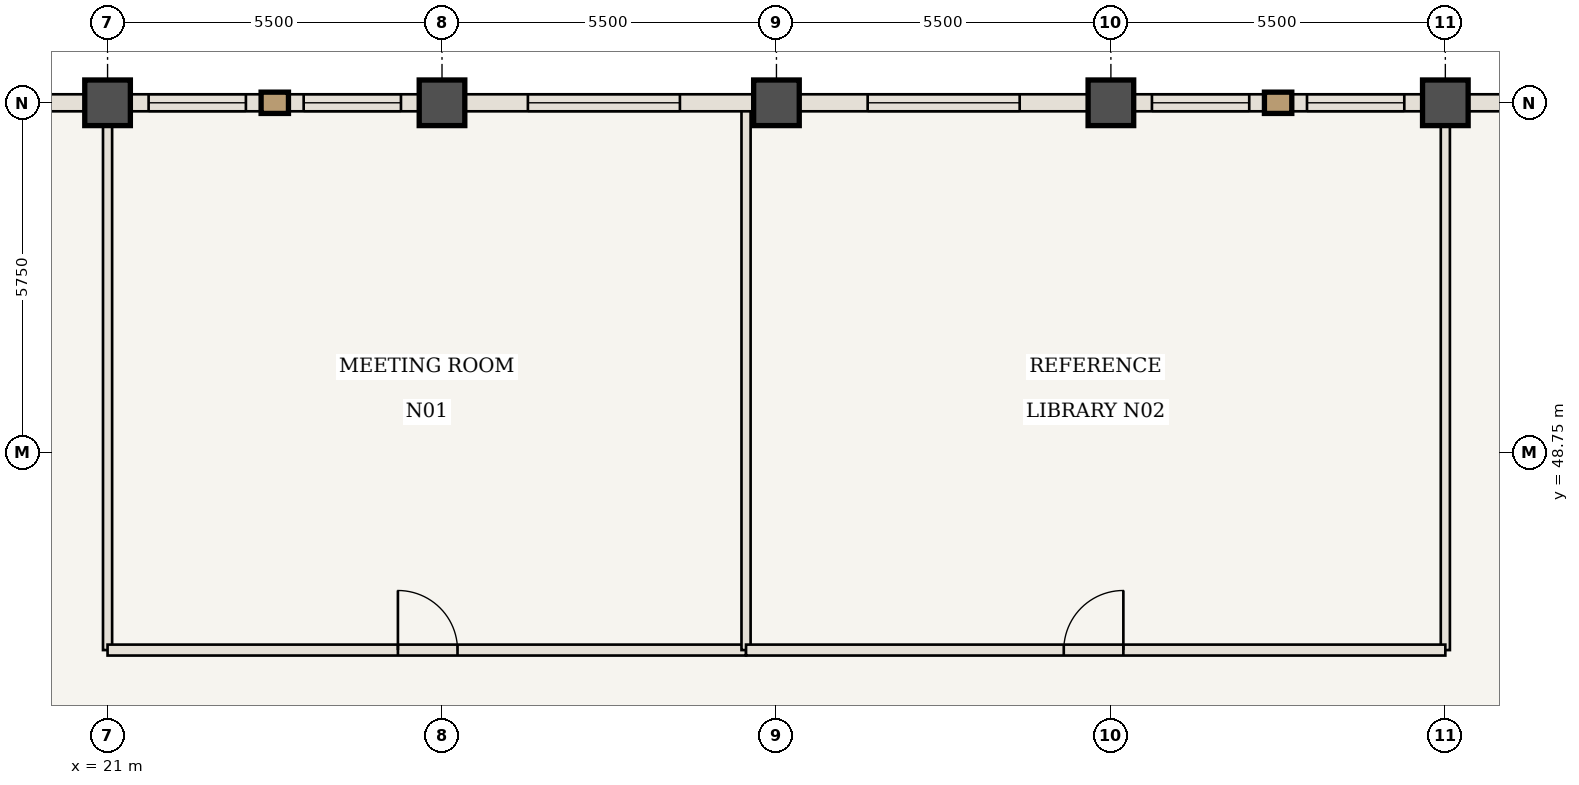
"""IFC4 building model, lengths in metres.
Left out: names, types, materials, properties, quantities, classifications, styles, units other than length and angle.
Written with IfcOpenShell. Run it as: python <this file> out.ifc"""

import sys

from ifc_helpers import new_model, si_unit, direction, frame, frame_2d, origin, origin_2d, place, context, subcontext, project, spatial, rectangle, extrude, element, fill, save


model = new_model("IFC4")
c1 = context("Model", 3, precision=1e-05, world=origin(), true_north=direction((0.0, 1.0)))
c2 = subcontext(c1, "Body", "Model", "MODEL_VIEW")
j1 = project(units=[si_unit("LENGTHUNIT", "METRE"), si_unit("PLANEANGLEUNIT", "RADIAN")], contexts=[c1])
p1 = place(None, origin())
s1 = spatial("IfcSite", under=j1, at=p1, CompositionType="ELEMENT")
p2 = place(p1, origin())
s2 = spatial("IfcBuilding", under=s1, at=p2, CompositionType="ELEMENT")
p3 = place(p2, frame((0.0, 0.0, 262.15)))
s3 = spatial("IfcBuildingStorey", under=s2, at=p3, CompositionType="ELEMENT", Elevation=262.15)
for number, where, z_axis, x_axis in (
    (1, (21.0, 54.5, 0.0), (0.0, 0.0, 1.0), (1.0, 0.0, 0.0)),
    (2, (26.5, 54.5, 0.0), (0.0, 0.0, 1.0), (1.0, 0.0, 0.0)),
    (3, (32.0, 54.5, 0.0), (0.0, 0.0, 1.0), (1.0, 0.0, 0.0)),
    (4, (37.5, 54.5, 0.0), (0.0, 0.0, 1.0), (1.0, 0.0, 0.0)),
    (5, (43.0, 54.5, 0.0), (0.0, 0.0, 1.0), (1.0, 0.0, 0.0)),
):
    element("IfcColumn", number, at=place(p3, frame(where, z_axis=z_axis, x_axis=x_axis)), inside=s3, PredefinedType="COLUMN", context=c2, shape_type="SweptSolid", body=[
        extrude(rectangle(XDim=0.75, YDim=0.75, at=origin_2d()), origin(), (0.0, 0.0, 1.0), 3.85),
    ])
for number, where, z_axis, x_axis in (
    (6, (21.0, 45.5, 0.0), (0.0, 0.0, 1.0), (0.0, 1.0, 0.0)),
    (7, (43.0, 45.5, 0.0), (0.0, 0.0, 1.0), (0.0, 1.0, 0.0)),
):
    element("IfcWall", number, at=place(p3, frame(where, z_axis=z_axis, x_axis=x_axis)), inside=s3, PredefinedType="STANDARD", context=c2, shape_type="SweptSolid", body=[
        extrude(rectangle(XDim=8.94, YDim=0.15, at=frame_2d((4.47, 0.0))), origin(), (0.0, 0.0, 1.0), 3.43),
    ])
p4 = place(p3, frame((21.0, 45.5, 0.0), z_axis=(0.0, 0.0, 1.0), x_axis=(1.0, 0.0, 0.0)))
e8 = element("IfcWall", 8, at=p4, inside=s3, PredefinedType="STANDARD", context=c2, shape_type="SweptSolid", body=[
    extrude(rectangle(XDim=10.5, YDim=0.18, at=frame_2d((5.25, 0.0))), origin(), (0.0, 0.0, 1.0), 3.43),
])
p5 = place(p4, frame((4.775, 0.0, 0.0)))
e9 = element("IfcOpeningElement", 9, at=p5, cuts=e8, PredefinedType="OPENING", context=c2, shape_type="SweptSolid", body=[
    extrude(rectangle(XDim=0.98, YDim=2.2, at=frame_2d((0.49, 1.1))), frame((0.0, 0.1, 0.0), z_axis=(0.0, -1.0, 0.0), x_axis=(1.0, 0.0, 0.0)), (0.0, 0.0, 1.0), 0.2),
])
p6 = place(p3, frame((31.5, 45.5, 0.0), z_axis=(0.0, 0.0, 1.0), x_axis=(0.0, 1.0, 0.0)))
e10 = element("IfcWall", 10, at=p6, inside=s3, PredefinedType="STANDARD", context=c2, shape_type="SweptSolid", body=[
    extrude(rectangle(XDim=8.94, YDim=0.15, at=frame_2d((4.47, 0.0))), origin(), (0.0, 0.0, 1.0), 3.43),
])
p7 = place(p3, frame((31.5, 45.5, 0.0), z_axis=(0.0, 0.0, 1.0), x_axis=(1.0, 0.0, 0.0)))
e11 = element("IfcWall", 11, at=p7, inside=s3, PredefinedType="STANDARD", context=c2, shape_type="SweptSolid", body=[
    extrude(rectangle(XDim=11.5, YDim=0.18, at=frame_2d((5.75, 0.0))), origin(), (0.0, 0.0, 1.0), 3.43),
])
p8 = place(p7, frame((5.225, 0.0, 0.0)))
e12 = element("IfcOpeningElement", 12, at=p8, cuts=e11, PredefinedType="OPENING", context=c2, shape_type="SweptSolid", body=[
    extrude(rectangle(XDim=0.98, YDim=2.2, at=frame_2d((0.49, 1.1))), frame((0.0, 0.1, 0.0), z_axis=(0.0, -1.0, 0.0), x_axis=(1.0, 0.0, 0.0)), (0.0, 0.0, 1.0), 0.2),
])
p9 = place(p3, frame((15.5, 54.5, 0.0), z_axis=(0.0, 0.0, 1.0), x_axis=(1.0, 0.0, 0.0)))
e13 = element("IfcWall", 13, at=p9, inside=s3, PredefinedType="USERDEFINED", context=c2, shape_type="SweptSolid", body=[
    extrude(rectangle(XDim=5.5, YDim=0.28, at=frame_2d((2.75, 0.0))), origin(), (0.0, 0.0, 1.0), 2.73),
])
p10 = place(p3, frame((21.0, 54.5, 0.0), z_axis=(0.0, 0.0, 1.0), x_axis=(1.0, 0.0, 0.0)))
e14 = element("IfcWall", 14, at=p10, inside=s3, PredefinedType="USERDEFINED", context=c2, shape_type="SweptSolid", body=[
    extrude(rectangle(XDim=5.5, YDim=0.28, at=frame_2d((2.75, 0.0))), origin(), (0.0, 0.0, 1.0), 2.73),
])
p11 = place(p10, frame((0.675, 0.0, 0.85)))
e15 = element("IfcOpeningElement", 15, at=p11, cuts=e14, PredefinedType="OPENING", context=c2, shape_type="SweptSolid", body=[
    extrude(rectangle(XDim=1.6, YDim=1.68, at=frame_2d((0.8, 0.84))), frame((0.0, 0.15, 0.0), z_axis=(0.0, -1.0, 0.0), x_axis=(1.0, 0.0, 0.0)), (0.0, 0.0, 1.0), 0.3),
])
p12 = place(p10, frame((3.225, 0.0, 0.85)))
e16 = element("IfcOpeningElement", 16, at=p12, cuts=e14, PredefinedType="OPENING", context=c2, shape_type="SweptSolid", body=[
    extrude(rectangle(XDim=1.6, YDim=1.68, at=frame_2d((0.8, 0.84))), frame((0.0, 0.15, 0.0), z_axis=(0.0, -1.0, 0.0), x_axis=(1.0, 0.0, 0.0)), (0.0, 0.0, 1.0), 0.3),
])
p13 = place(p3, frame((26.5, 54.5, 0.0), z_axis=(0.0, 0.0, 1.0), x_axis=(1.0, 0.0, 0.0)))
e17 = element("IfcWall", 17, at=p13, inside=s3, PredefinedType="USERDEFINED", context=c2, shape_type="SweptSolid", body=[
    extrude(rectangle(XDim=5.5, YDim=0.28, at=frame_2d((2.75, 0.0))), origin(), (0.0, 0.0, 1.0), 2.73),
])
p14 = place(p13, frame((1.413, 0.0, 0.85)))
e18 = element("IfcOpeningElement", 18, at=p14, cuts=e17, PredefinedType="OPENING", context=c2, shape_type="SweptSolid", body=[
    extrude(rectangle(XDim=2.5, YDim=1.68, at=frame_2d((1.25, 0.84))), frame((0.0, 0.15, 0.0), z_axis=(0.0, -1.0, 0.0), x_axis=(1.0, 0.0, 0.0)), (0.0, 0.0, 1.0), 0.3),
])
p15 = place(p3, frame((32.0, 54.5, 0.0), z_axis=(0.0, 0.0, 1.0), x_axis=(1.0, 0.0, 0.0)))
e19 = element("IfcWall", 19, at=p15, inside=s3, PredefinedType="USERDEFINED", context=c2, shape_type="SweptSolid", body=[
    extrude(rectangle(XDim=5.5, YDim=0.28, at=frame_2d((2.75, 0.0))), origin(), (0.0, 0.0, 1.0), 2.73),
])
p16 = place(p15, frame((1.5, 0.0, 0.85)))
e20 = element("IfcOpeningElement", 20, at=p16, cuts=e19, PredefinedType="OPENING", context=c2, shape_type="SweptSolid", body=[
    extrude(rectangle(XDim=2.5, YDim=1.68, at=frame_2d((1.25, 0.84))), frame((0.0, 0.15, 0.0), z_axis=(0.0, -1.0, 0.0), x_axis=(1.0, 0.0, 0.0)), (0.0, 0.0, 1.0), 0.3),
])
p17 = place(p3, frame((37.5, 54.5, 0.0), z_axis=(0.0, 0.0, 1.0), x_axis=(1.0, 0.0, 0.0)))
e21 = element("IfcWall", 21, at=p17, inside=s3, PredefinedType="USERDEFINED", context=c2, shape_type="SweptSolid", body=[
    extrude(rectangle(XDim=5.5, YDim=0.28, at=frame_2d((2.75, 0.0))), origin(), (0.0, 0.0, 1.0), 2.73),
])
p18 = place(p17, frame((0.675, 0.0, 0.85)))
e22 = element("IfcOpeningElement", 22, at=p18, cuts=e21, PredefinedType="OPENING", context=c2, shape_type="SweptSolid", body=[
    extrude(rectangle(XDim=1.6, YDim=1.68, at=frame_2d((0.8, 0.84))), frame((0.0, 0.15, 0.0), z_axis=(0.0, -1.0, 0.0), x_axis=(1.0, 0.0, 0.0)), (0.0, 0.0, 1.0), 0.3),
])
p19 = place(p17, frame((3.225, 0.0, 0.85)))
e23 = element("IfcOpeningElement", 23, at=p19, cuts=e21, PredefinedType="OPENING", context=c2, shape_type="SweptSolid", body=[
    extrude(rectangle(XDim=1.6, YDim=1.68, at=frame_2d((0.8, 0.84))), frame((0.0, 0.15, 0.0), z_axis=(0.0, -1.0, 0.0), x_axis=(1.0, 0.0, 0.0)), (0.0, 0.0, 1.0), 0.3),
])
p20 = place(p3, frame((43.0, 54.5, 0.0), z_axis=(0.0, 0.0, 1.0), x_axis=(1.0, 0.0, 0.0)))
e24 = element("IfcWall", 24, at=p20, inside=s3, PredefinedType="USERDEFINED", context=c2, shape_type="SweptSolid", body=[
    extrude(rectangle(XDim=5.5, YDim=0.28, at=frame_2d((2.75, 0.0))), origin(), (0.0, 0.0, 1.0), 2.73),
])
p21 = place(p5, origin())
e25 = element("IfcDoor", 25, at=p21, inside=s3, OperationType="SINGLE_SWING_LEFT", PredefinedType="DOOR", context=c2, shape_type="SweptSolid", body=[
    extrude(rectangle(XDim=0.98, YDim=2.2, at=frame_2d((0.49, 1.1))), frame((0.0, 0.025, 0.0), z_axis=(0.0, -1.0, 0.0), x_axis=(1.0, 0.0, 0.0)), (0.0, 0.0, 1.0), 0.05),
])
fill(e9, e25)
p22 = place(p8, origin())
e26 = element("IfcDoor", 26, at=p22, inside=s3, OperationType="SINGLE_SWING_RIGHT", PredefinedType="DOOR", context=c2, shape_type="SweptSolid", body=[
    extrude(rectangle(XDim=0.98, YDim=2.2, at=frame_2d((0.49, 1.1))), frame((0.0, 0.025, 0.0), z_axis=(0.0, -1.0, 0.0), x_axis=(1.0, 0.0, 0.0)), (0.0, 0.0, 1.0), 0.05),
])
fill(e12, e26)
p23 = place(p11, origin())
e27 = element("IfcWindow", 27, at=p23, inside=s3, PartitioningType="SINGLE_PANEL", PredefinedType="WINDOW", context=c2, shape_type="SweptSolid", body=[
    extrude(rectangle(XDim=1.6, YDim=1.68, at=frame_2d((0.8, 0.84))), frame((0.0, 0.03, 0.0), z_axis=(0.0, -1.0, 0.0), x_axis=(1.0, 0.0, 0.0)), (0.0, 0.0, 1.0), 0.06),
])
fill(e15, e27)
p24 = place(p12, origin())
e28 = element("IfcWindow", 28, at=p24, inside=s3, PartitioningType="SINGLE_PANEL", PredefinedType="WINDOW", context=c2, shape_type="SweptSolid", body=[
    extrude(rectangle(XDim=1.6, YDim=1.68, at=frame_2d((0.8, 0.84))), frame((0.0, 0.03, 0.0), z_axis=(0.0, -1.0, 0.0), x_axis=(1.0, 0.0, 0.0)), (0.0, 0.0, 1.0), 0.06),
])
fill(e16, e28)
p25 = place(p14, origin())
e29 = element("IfcWindow", 29, at=p25, inside=s3, PartitioningType="SINGLE_PANEL", PredefinedType="WINDOW", context=c2, shape_type="SweptSolid", body=[
    extrude(rectangle(XDim=2.5, YDim=1.68, at=frame_2d((1.25, 0.84))), frame((0.0, 0.03, 0.0), z_axis=(0.0, -1.0, 0.0), x_axis=(1.0, 0.0, 0.0)), (0.0, 0.0, 1.0), 0.06),
])
fill(e18, e29)
p26 = place(p16, origin())
e30 = element("IfcWindow", 30, at=p26, inside=s3, PartitioningType="SINGLE_PANEL", PredefinedType="WINDOW", context=c2, shape_type="SweptSolid", body=[
    extrude(rectangle(XDim=2.5, YDim=1.68, at=frame_2d((1.25, 0.84))), frame((0.0, 0.03, 0.0), z_axis=(0.0, -1.0, 0.0), x_axis=(1.0, 0.0, 0.0)), (0.0, 0.0, 1.0), 0.06),
])
fill(e20, e30)
p27 = place(p18, origin())
e31 = element("IfcWindow", 31, at=p27, inside=s3, PartitioningType="SINGLE_PANEL", PredefinedType="WINDOW", context=c2, shape_type="SweptSolid", body=[
    extrude(rectangle(XDim=1.6, YDim=1.68, at=frame_2d((0.8, 0.84))), frame((0.0, 0.03, 0.0), z_axis=(0.0, -1.0, 0.0), x_axis=(1.0, 0.0, 0.0)), (0.0, 0.0, 1.0), 0.06),
])
fill(e22, e31)
p28 = place(p19, origin())
e32 = element("IfcWindow", 32, at=p28, inside=s3, PartitioningType="SINGLE_PANEL", PredefinedType="WINDOW", context=c2, shape_type="SweptSolid", body=[
    extrude(rectangle(XDim=1.6, YDim=1.68, at=frame_2d((0.8, 0.84))), frame((0.0, 0.03, 0.0), z_axis=(0.0, -1.0, 0.0), x_axis=(1.0, 0.0, 0.0)), (0.0, 0.0, 1.0), 0.06),
])
fill(e23, e32)
save(model, sys.argv[1])
